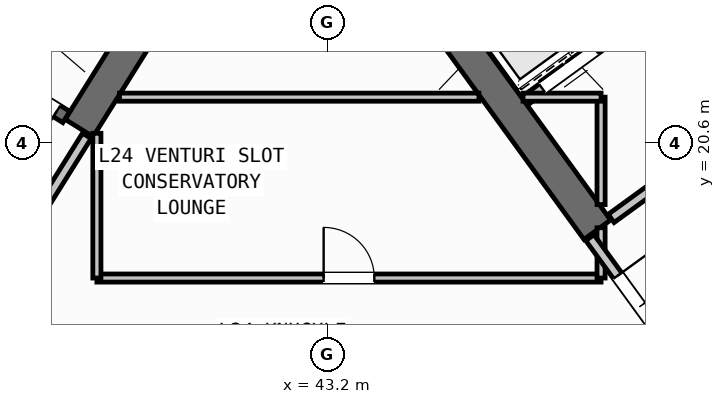
"""IFC4 building model, lengths in metres.
Left out: names, types, materials, properties, quantities, classifications, styles, units other than length and angle.
Written with IfcOpenShell. Run it as: python <this file> out.ifc"""

import sys

from ifc_helpers import new_model, si_unit, direction, frame, frame_2d, origin, place, context, subcontext, project, spatial, rectangle, extrude, source, transform, mapped, element, fill, save


model = new_model("IFC4")
c1 = context("Model", 3, precision=1e-05, world=origin(), true_north=direction((0.0, 1.0)))
c2 = subcontext(c1, "Body", "Model", "MODEL_VIEW")
j1 = project(units=[si_unit("LENGTHUNIT", "METRE"), si_unit("PLANEANGLEUNIT", "RADIAN")], contexts=[c1])
p1 = place(None, origin())
s1 = spatial("IfcSite", under=j1, at=p1, CompositionType="ELEMENT")
p2 = place(p1, origin())
s2 = spatial("IfcBuilding", under=s1, at=p2, CompositionType="ELEMENT")
p3 = place(p2, frame((0.0, 0.0, 97.2)))
s3 = spatial("IfcBuildingStorey", under=s2, at=p3, CompositionType="ELEMENT", Elevation=97.2)
p4 = place(p3, frame((40.168, 23.88, 0.0), z_axis=(0.0, 0.0, 1.0), x_axis=(-0.529893103397, -0.8480644427, 0.0)))
e1 = element("IfcWall", 1, at=p4, inside=s3, PredefinedType="SHEAR", context=c2, shape_type="SweptSolid", body=[
    extrude(rectangle(XDim=3.525, YDim=0.65, at=frame_2d((1.763, 0.0))), origin(), (0.0, 0.0, 1.0), 3.32),
])
p5 = place(p3, frame((48.526, 18.884, 0.0), z_axis=(0.0, 0.0, 1.0), x_axis=(-0.58777996584, 0.809020835181, 0.0)))
e2 = element("IfcWall", 2, at=p5, inside=s3, PredefinedType="SHEAR", context=c2, shape_type="SweptSolid", body=[
    extrude(rectangle(XDim=6.375, YDim=0.65, at=frame_2d((3.188, 0.0))), origin(), (0.0, 0.0, 1.0), 3.32),
])
p6 = place(p3, frame((38.046, 21.108, 0.0), z_axis=(0.0, 0.0, 1.0), x_axis=(-0.848054434086, 0.529909121291, 0.0)))
e3 = element("IfcWall", 3, at=p6, inside=s3, PredefinedType="SHEAR", context=c2, shape_type="SweptSolid", body=[
    extrude(rectangle(XDim=7.33, YDim=0.26, at=frame_2d((3.665, 0.0))), origin(), (0.0, 0.0, 1.0), 3.32),
])
p7 = place(p6, frame((0.22, 0.0, 0.0)))
e4 = element("IfcOpeningElement", 4, at=p7, cuts=e3, PredefinedType="OPENING", context=c2, shape_type="SweptSolid", body=[
    extrude(rectangle(XDim=1.1, YDim=2.1, at=frame_2d((0.55, 1.05))), frame((0.0, 0.14, 0.0), z_axis=(0.0, -1.0, 0.0), x_axis=(1.0, 0.0, 0.0)), (0.0, 0.0, 1.0), 0.28),
])
p8 = place(p3, frame((47.106, 21.437, 0.0), z_axis=(0.0, 0.0, 1.0), x_axis=(0.809012514015, 0.58779141893, 0.0)))
e5 = element("IfcWall", 5, at=p8, inside=s3, PredefinedType="STANDARD", context=c2, shape_type="SweptSolid", body=[
    extrude(rectangle(XDim=3.398, YDim=0.2, at=frame_2d((1.699, 0.0))), origin(), (0.0, 0.0, 1.0), 3.31),
])
p9 = place(p8, frame((0.408, 0.0, 0.0)))
e6 = element("IfcOpeningElement", 6, at=p9, cuts=e5, PredefinedType="OPENING", context=c2, shape_type="SweptSolid", body=[
    extrude(rectangle(XDim=1.3, YDim=2.2, at=frame_2d((0.65, 1.1))), frame((0.0, 0.11, 0.0), z_axis=(0.0, -1.0, 0.0), x_axis=(1.0, 0.0, 0.0)), (0.0, 0.0, 1.0), 0.22),
])
p10 = place(p3, frame((48.799, 19.107, 0.0), z_axis=(0.0, 0.0, 1.0), x_axis=(0.809012959416, 0.587790805897, 0.0)))
e7 = element("IfcWall", 7, at=p10, inside=s3, PredefinedType="STANDARD", context=c2, shape_type="SweptSolid", body=[
    extrude(rectangle(XDim=5.718, YDim=0.2, at=frame_2d((2.859, 0.0))), origin(), (0.0, 0.0, 1.0), 3.31),
])
p11 = place(p10, frame((2.498, 0.0, 0.0)))
e8 = element("IfcOpeningElement", 8, at=p11, cuts=e7, PredefinedType="OPENING", context=c2, shape_type="SweptSolid", body=[
    extrude(rectangle(XDim=1.15, YDim=2.1, at=frame_2d((0.575, 1.05))), frame((0.0, 0.11, 0.0), z_axis=(0.0, -1.0, 0.0), x_axis=(1.0, 0.0, 0.0)), (0.0, 0.0, 1.0), 0.22),
])
p12 = place(p3, frame((38.451, 20.737, 0.0), z_axis=(0.0, 0.0, 1.0), x_axis=(-0.529924799939, -0.848044637038, 0.0)))
e9 = element("IfcWall", 9, at=p12, inside=s3, PredefinedType="STANDARD", context=c2, shape_type="SweptSolid", body=[
    extrude(rectangle(XDim=2.96, YDim=0.2, at=frame_2d((1.48, 0.0))), origin(), (0.0, 0.0, 1.0), 3.31),
])
p13 = place(p12, frame((1.46, 0.0, 0.0)))
e10 = element("IfcOpeningElement", 10, at=p13, cuts=e9, PredefinedType="OPENING", context=c2, shape_type="SweptSolid", body=[
    extrude(rectangle(XDim=0.86, YDim=2.05, at=frame_2d((0.43, 1.025))), frame((0.0, 0.11, 0.0), z_axis=(0.0, -1.0, 0.0), x_axis=(1.0, 0.0, 0.0)), (0.0, 0.0, 1.0), 0.22),
])
p14 = place(p3, frame((38.65, 17.93, 0.0), z_axis=(0.0, 0.0, 1.0), x_axis=(1.0, 0.0, 0.0)))
e11 = element("IfcWall", 11, at=p14, inside=s3, PredefinedType="PARTITIONING", context=c2, shape_type="SweptSolid", body=[
    extrude(rectangle(XDim=9.95, YDim=0.16, at=frame_2d((4.975, 0.0))), origin(), (0.0, 0.0, 1.0), 3.31),
])
p15 = place(p14, frame((4.475, 0.0, 0.0)))
e12 = element("IfcOpeningElement", 12, at=p15, cuts=e11, PredefinedType="OPENING", context=c2, shape_type="SweptSolid", body=[
    extrude(rectangle(XDim=1.0, YDim=2.1, at=frame_2d((0.5, 1.05))), frame((0.0, 0.09, 0.0), z_axis=(0.0, -1.0, 0.0), x_axis=(1.0, 0.0, 0.0)), (0.0, 0.0, 1.0), 0.18),
])
p16 = place(p3, frame((38.65, 17.93, 0.0), z_axis=(0.0, 0.0, 1.0), x_axis=(0.0, 1.0, 0.0)))
e13 = element("IfcWall", 13, at=p16, inside=s3, PredefinedType="PARTITIONING", context=c2, shape_type="SweptSolid", body=[
    extrude(rectangle(XDim=2.857, YDim=0.16, at=frame_2d((1.428, 0.0))), origin(), (0.0, 0.0, 1.0), 3.31),
])
p17 = place(p3, frame((48.6, 17.93, 0.0), z_axis=(0.0, 0.0, 1.0), x_axis=(0.0, 1.0, 0.0)))
e14 = element("IfcWall", 14, at=p17, inside=s3, PredefinedType="PARTITIONING", context=c2, shape_type="SweptSolid", body=[
    extrude(rectangle(XDim=0.993, YDim=0.16, at=frame_2d((0.496, 0.0))), origin(), (0.0, 0.0, 1.0), 3.31),
])
p18 = place(p3, frame((48.6, 19.38, 0.0), z_axis=(0.0, 0.0, 1.0), x_axis=(0.0, 1.0, 0.0)))
e15 = element("IfcWall", 15, at=p18, inside=s3, PredefinedType="PARTITIONING", context=c2, shape_type="SweptSolid", body=[
    extrude(rectangle(XDim=2.12, YDim=0.16, at=frame_2d((1.06, 0.0))), origin(), (0.0, 0.0, 1.0), 3.31),
])
p19 = place(p3, frame((39.095, 21.5, 0.0), z_axis=(0.0, 0.0, 1.0), x_axis=(1.0, 0.0, 0.0)))
e16 = element("IfcWall", 16, at=p19, inside=s3, PredefinedType="PARTITIONING", context=c2, shape_type="SweptSolid", body=[
    extrude(rectangle(XDim=7.094, YDim=0.16, at=frame_2d((3.547, 0.0))), origin(), (0.0, 0.0, 1.0), 3.31),
])
p20 = place(p3, frame((47.06, 21.5, 0.0), z_axis=(0.0, 0.0, 1.0), x_axis=(1.0, 0.0, 0.0)))
e17 = element("IfcWall", 17, at=p20, inside=s3, PredefinedType="PARTITIONING", context=c2, shape_type="SweptSolid", body=[
    extrude(rectangle(XDim=1.54, YDim=0.16, at=frame_2d((0.77, 0.0))), origin(), (0.0, 0.0, 1.0), 3.31),
])
p21 = place(p3, frame((50.119, 16.333, 0.0), z_axis=(0.0, 0.0, 1.0), x_axis=(-0.587749856981, 0.809042709391, 0.0)))
e18 = element("IfcWall", 18, at=p21, inside=s3, PredefinedType="STANDARD", context=c2, shape_type="SweptSolid", body=[
    extrude(rectangle(XDim=2.96, YDim=0.2, at=frame_2d((1.48, 0.0))), origin(), (0.0, 0.0, 1.0), 3.31),
])
p22 = place(p21, frame((0.53, 0.0, 0.0)))
e19 = element("IfcOpeningElement", 19, at=p22, cuts=e18, PredefinedType="OPENING", context=c2, shape_type="SweptSolid", body=[
    extrude(rectangle(XDim=1.5, YDim=2.15, at=frame_2d((0.75, 1.075))), frame((0.0, 0.11, 0.0), z_axis=(0.0, -1.0, 0.0), x_axis=(1.0, 0.0, 0.0)), (0.0, 0.0, 1.0), 0.22),
])
m1 = source(origin(), c2, "Body", "SweptSolid", [
    extrude(rectangle(XDim=1.1, YDim=2.1, at=frame_2d((0.55, 1.05))), frame((0.0, 0.025, 0.0), z_axis=(0.0, -1.0, 0.0), x_axis=(1.0, 0.0, 0.0)), (0.0, 0.0, 1.0), 0.05),
])
p23 = place(p7, origin())
e20 = element("IfcDoor", 20, at=p23, inside=s3, OperationType="SINGLE_SWING_LEFT", PredefinedType="DOOR", context=c2, shape_type="MappedRepresentation", body=[
    mapped(m1, transform((0.0, 0.0, 0.0), scale=1.0)),
])
fill(e4, e20)
m2 = source(origin(), c2, "Body", "SweptSolid", [
    extrude(rectangle(XDim=1.3, YDim=2.2, at=frame_2d((0.65, 1.1))), frame((0.0, 0.025, 0.0), z_axis=(0.0, -1.0, 0.0), x_axis=(1.0, 0.0, 0.0)), (0.0, 0.0, 1.0), 0.05),
])
p24 = place(p9, origin())
e21 = element("IfcDoor", 21, at=p24, inside=s3, OperationType="DOUBLE_DOOR_SLIDING", PredefinedType="DOOR", context=c2, shape_type="MappedRepresentation", body=[
    mapped(m2, transform((0.0, 0.0, 0.0), scale=1.0)),
])
fill(e6, e21)
m3 = source(origin(), c2, "Body", "SweptSolid", [
    extrude(rectangle(XDim=1.0, YDim=2.1, at=frame_2d((0.5, 1.05))), frame((0.0, 0.025, 0.0), z_axis=(0.0, -1.0, 0.0), x_axis=(1.0, 0.0, 0.0)), (0.0, 0.0, 1.0), 0.05),
])
p25 = place(p15, origin())
e22 = element("IfcDoor", 22, at=p25, inside=s3, OperationType="SINGLE_SWING_LEFT", PredefinedType="DOOR", context=c2, shape_type="MappedRepresentation", body=[
    mapped(m3, transform((0.0, 0.0, 0.0), scale=1.0)),
])
fill(e12, e22)
m4 = source(origin(), c2, "Body", "SweptSolid", [
    extrude(rectangle(XDim=1.5, YDim=2.15, at=frame_2d((0.75, 1.075))), frame((0.0, 0.025, 0.0), z_axis=(0.0, -1.0, 0.0), x_axis=(1.0, 0.0, 0.0)), (0.0, 0.0, 1.0), 0.05),
])
p26 = place(p22, frame((1.5, 0.0, 0.0), z_axis=(0.0, 0.0, 1.0), x_axis=(-1.0, 0.0, 0.0)))
e23 = element("IfcDoor", 23, at=p26, inside=s3, OperationType="DOUBLE_DOOR_SINGLE_SWING", PredefinedType="DOOR", context=c2, shape_type="MappedRepresentation", body=[
    mapped(m4, transform((0.0, 0.0, 0.0), scale=1.0)),
])
fill(e19, e23)
save(model, sys.argv[1])
